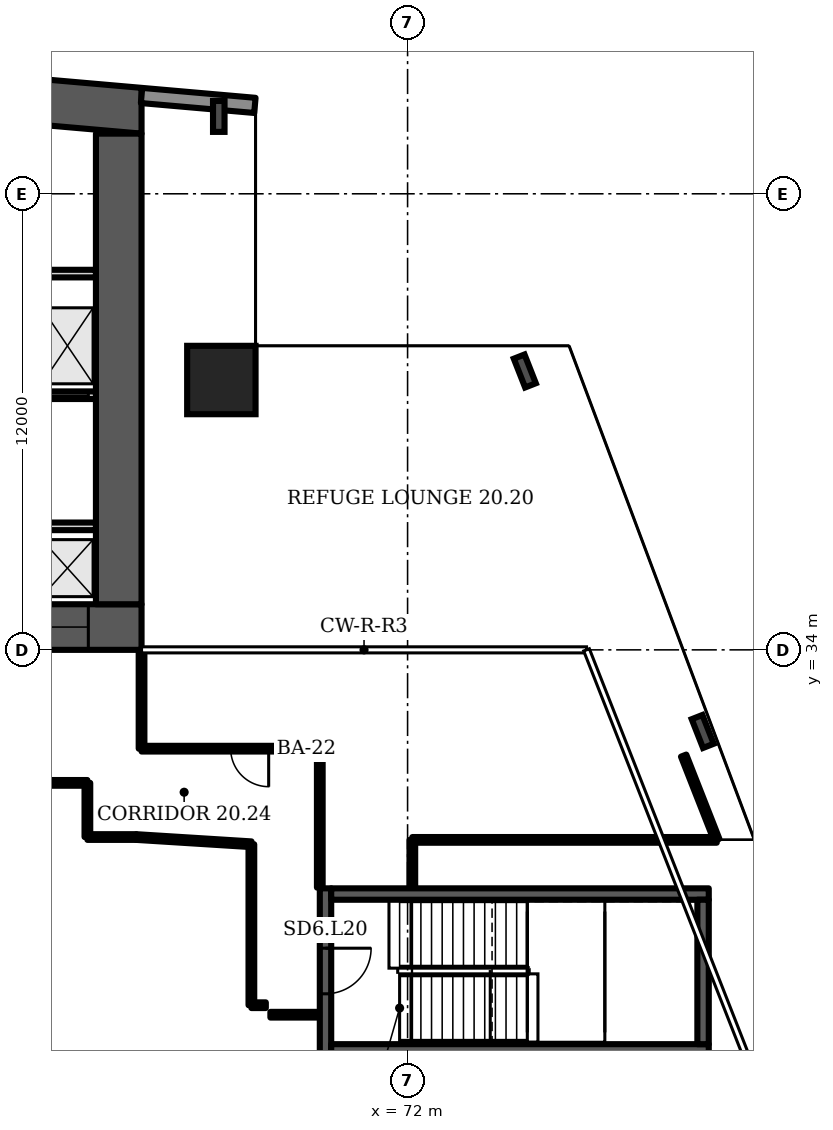
"""IFC4 building model, lengths in metres.
Left out: names, types, materials, properties, quantities, classifications, styles, units other than length and angle.
Written with IfcOpenShell. Run it as: python <this file> out.ifc"""

import sys

from ifc_helpers import new_model, si_unit, direction, frame, frame_2d, origin, origin_2d, place, context, subcontext, project, spatial, polyline, rectangle, i_section, outline, extrude, element, fill, save


model = new_model("IFC4")
c1 = context("Model", 3, precision=1e-05, world=origin(), true_north=direction((0.0, 1.0)))
c2 = subcontext(c1, "Body", "Model", "MODEL_VIEW")
j1 = project(units=[si_unit("LENGTHUNIT", "METRE"), si_unit("PLANEANGLEUNIT", "RADIAN")], contexts=[c1])
p1 = place(None, origin())
s1 = spatial("IfcSite", under=j1, at=p1, CompositionType="ELEMENT")
p2 = place(p1, origin())
s2 = spatial("IfcBuilding", under=s1, at=p2, CompositionType="ELEMENT")
p3 = place(p2, frame((0.0, 0.0, 91.9)))
s3 = spatial("IfcBuildingStorey", under=s2, at=p3, CompositionType="ELEMENT", Elevation=91.9)
p4 = place(p3, origin())
e1 = element("IfcWall", 1, at=p4, inside=s3, PredefinedType="SHEAR", context=c2, shape_type="SweptSolid", body=[
    extrude(outline(polyline([(9.0, 47.583), (37.0, 50.032), (65.0, 47.583), (65.0, 48.787), (37.0, 51.237), (9.0, 48.787), (9.0, 47.583)])), origin(), (0.0, 0.0, 1.0), 4.8),
])
p5 = place(p3, frame((9.0, 34.6, 0.0), z_axis=(0.0, 0.0, 1.0), x_axis=(1.0, 0.0, 0.0)))
e2 = element("IfcWall", 2, at=p5, inside=s3, PredefinedType="SHEAR", context=c2, shape_type="SweptSolid", body=[
    extrude(rectangle(XDim=56.0, YDim=1.2, at=frame_2d((28.0, 0.0))), origin(), (0.0, 0.0, 1.0), 4.8),
])
p6 = place(p5, frame((3.3, 0.0, 0.0)))
e3 = element("IfcOpeningElement", 3, at=p6, cuts=e2, PredefinedType="OPENING", context=c2, shape_type="SweptSolid", body=[
    extrude(rectangle(XDim=1.0, YDim=2.1, at=frame_2d((0.5, 1.05))), frame((0.0, 0.61, 0.0), z_axis=(0.0, -1.0, 0.0), x_axis=(1.0, 0.0, 0.0)), (0.0, 0.0, 1.0), 1.22),
])
p7 = place(p5, frame((7.867, 0.0, 0.0)))
e4 = element("IfcOpeningElement", 4, at=p7, cuts=e2, PredefinedType="OPENING", context=c2, shape_type="SweptSolid", body=[
    extrude(rectangle(XDim=1.1, YDim=2.1, at=frame_2d((0.55, 1.05))), frame((0.0, 0.61, 0.0), z_axis=(0.0, -1.0, 0.0), x_axis=(1.0, 0.0, 0.0)), (0.0, 0.0, 1.0), 1.22),
])
p8 = place(p5, frame((12.033, 0.0, 0.0)))
e5 = element("IfcOpeningElement", 5, at=p8, cuts=e2, PredefinedType="OPENING", context=c2, shape_type="SweptSolid", body=[
    extrude(rectangle(XDim=1.1, YDim=2.1, at=frame_2d((0.55, 1.05))), frame((0.0, 0.61, 0.0), z_axis=(0.0, -1.0, 0.0), x_axis=(1.0, 0.0, 0.0)), (0.0, 0.0, 1.0), 1.22),
])
p9 = place(p5, frame((9.8, 0.0, 0.0)))
e6 = element("IfcOpeningElement", 6, at=p9, cuts=e2, PredefinedType="OPENING", context=c2, shape_type="SweptSolid", body=[
    extrude(rectangle(XDim=1.4, YDim=2.1, at=frame_2d((0.7, 1.05))), frame((0.0, 0.61, 0.0), z_axis=(0.0, -1.0, 0.0), x_axis=(1.0, 0.0, 0.0)), (0.0, 0.0, 1.0), 1.22),
])
p10 = place(p5, frame((14.65, 0.0, 0.0)))
e7 = element("IfcOpeningElement", 7, at=p10, cuts=e2, PredefinedType="OPENING", context=c2, shape_type="SweptSolid", body=[
    extrude(rectangle(XDim=1.2, YDim=2.1, at=frame_2d((0.6, 1.05))), frame((0.0, 0.61, 0.0), z_axis=(0.0, -1.0, 0.0), x_axis=(1.0, 0.0, 0.0)), (0.0, 0.0, 1.0), 1.22),
])
p11 = place(p5, frame((21.867, 0.0, 0.0)))
e8 = element("IfcOpeningElement", 8, at=p11, cuts=e2, PredefinedType="OPENING", context=c2, shape_type="SweptSolid", body=[
    extrude(rectangle(XDim=1.1, YDim=2.1, at=frame_2d((0.55, 1.05))), frame((0.0, 0.61, 0.0), z_axis=(0.0, -1.0, 0.0), x_axis=(1.0, 0.0, 0.0)), (0.0, 0.0, 1.0), 1.22),
])
p12 = place(p5, frame((26.033, 0.0, 0.0)))
e9 = element("IfcOpeningElement", 9, at=p12, cuts=e2, PredefinedType="OPENING", context=c2, shape_type="SweptSolid", body=[
    extrude(rectangle(XDim=1.1, YDim=2.1, at=frame_2d((0.55, 1.05))), frame((0.0, 0.61, 0.0), z_axis=(0.0, -1.0, 0.0), x_axis=(1.0, 0.0, 0.0)), (0.0, 0.0, 1.0), 1.22),
])
p13 = place(p5, frame((23.8, 0.0, 0.0)))
e10 = element("IfcOpeningElement", 10, at=p13, cuts=e2, PredefinedType="OPENING", context=c2, shape_type="SweptSolid", body=[
    extrude(rectangle(XDim=1.4, YDim=2.1, at=frame_2d((0.7, 1.05))), frame((0.0, 0.61, 0.0), z_axis=(0.0, -1.0, 0.0), x_axis=(1.0, 0.0, 0.0)), (0.0, 0.0, 1.0), 1.22),
])
p14 = place(p5, frame((28.867, 0.0, 0.0)))
e11 = element("IfcOpeningElement", 11, at=p14, cuts=e2, PredefinedType="OPENING", context=c2, shape_type="SweptSolid", body=[
    extrude(rectangle(XDim=1.1, YDim=2.1, at=frame_2d((0.55, 1.05))), frame((0.0, 0.61, 0.0), z_axis=(0.0, -1.0, 0.0), x_axis=(1.0, 0.0, 0.0)), (0.0, 0.0, 1.0), 1.22),
])
p15 = place(p5, frame((33.033, 0.0, 0.0)))
e12 = element("IfcOpeningElement", 12, at=p15, cuts=e2, PredefinedType="OPENING", context=c2, shape_type="SweptSolid", body=[
    extrude(rectangle(XDim=1.1, YDim=2.1, at=frame_2d((0.55, 1.05))), frame((0.0, 0.61, 0.0), z_axis=(0.0, -1.0, 0.0), x_axis=(1.0, 0.0, 0.0)), (0.0, 0.0, 1.0), 1.22),
])
p16 = place(p5, frame((40.15, 0.0, 0.0)))
e13 = element("IfcOpeningElement", 13, at=p16, cuts=e2, PredefinedType="OPENING", context=c2, shape_type="SweptSolid", body=[
    extrude(rectangle(XDim=1.2, YDim=2.1, at=frame_2d((0.6, 1.05))), frame((0.0, 0.61, 0.0), z_axis=(0.0, -1.0, 0.0), x_axis=(1.0, 0.0, 0.0)), (0.0, 0.0, 1.0), 1.22),
])
p17 = place(p5, frame((44.8, 0.0, 0.0)))
e14 = element("IfcOpeningElement", 14, at=p17, cuts=e2, PredefinedType="OPENING", context=c2, shape_type="SweptSolid", body=[
    extrude(rectangle(XDim=1.4, YDim=2.1, at=frame_2d((0.7, 1.05))), frame((0.0, 0.61, 0.0), z_axis=(0.0, -1.0, 0.0), x_axis=(1.0, 0.0, 0.0)), (0.0, 0.0, 1.0), 1.22),
])
p18 = place(p5, frame((49.867, 0.0, 0.0)))
e15 = element("IfcOpeningElement", 15, at=p18, cuts=e2, PredefinedType="OPENING", context=c2, shape_type="SweptSolid", body=[
    extrude(rectangle(XDim=1.1, YDim=2.1, at=frame_2d((0.55, 1.05))), frame((0.0, 0.61, 0.0), z_axis=(0.0, -1.0, 0.0), x_axis=(1.0, 0.0, 0.0)), (0.0, 0.0, 1.0), 1.22),
])
p19 = place(p5, frame((53.5, 0.0, 0.0)))
e16 = element("IfcOpeningElement", 16, at=p19, cuts=e2, PredefinedType="OPENING", context=c2, shape_type="SweptSolid", body=[
    extrude(rectangle(XDim=1.1, YDim=2.1, at=frame_2d((0.55, 1.05))), frame((0.0, 0.61, 0.0), z_axis=(0.0, -1.0, 0.0), x_axis=(1.0, 0.0, 0.0)), (0.0, 0.0, 1.0), 1.22),
])
p20 = place(p5, frame((51.567, 0.0, 0.0)))
e17 = element("IfcOpeningElement", 17, at=p20, cuts=e2, PredefinedType="OPENING", context=c2, shape_type="SweptSolid", body=[
    extrude(rectangle(XDim=1.4, YDim=2.1, at=frame_2d((0.7, 1.05))), frame((0.0, 0.61, 0.0), z_axis=(0.0, -1.0, 0.0), x_axis=(1.0, 0.0, 0.0)), (0.0, 0.0, 1.0), 1.22),
])
p21 = place(p3, frame((64.4, 35.2, 0.0), z_axis=(0.0, 0.0, 1.0), x_axis=(0.0, 1.0, 0.0)))
e18 = element("IfcWall", 18, at=p21, inside=s3, PredefinedType="SHEAR", context=c2, shape_type="SweptSolid", body=[
    extrude(rectangle(XDim=12.383, YDim=1.2, at=frame_2d((6.191, 0.0))), origin(), (0.0, 0.0, 1.0), 4.8),
])
p22 = place(p3, frame((67.1, 41.1, 0.0), z_axis=(0.0, 0.0, 1.0), x_axis=(1.0, 0.0, 0.0)))
e19 = element("IfcColumn", 19, at=p22, inside=s3, PredefinedType="COLUMN", context=c2, shape_type="SweptSolid", body=[
    extrude(rectangle(XDim=1.8, YDim=1.8, at=origin_2d()), origin(), (0.0, 0.0, 1.0), 4.8),
])
for number, where, z_axis, x_axis in (
    (20, (79.766, 31.853, 0.0), (0.0, 0.0, 1.0), (0.931, 0.366, 0.0)),
    (21, (75.085, 41.338, 0.0), (0.0, 0.0, 1.0), (0.931, 0.366, 0.0)),
    (22, (67.032, 48.036, 0.0), (0.0, 0.0, 1.0), (1.0, 0.0, 0.0)),
):
    element("IfcColumn", number, at=place(p3, frame(where, z_axis=z_axis, x_axis=x_axis)), inside=s3, PredefinedType="COLUMN", context=c2, shape_type="SweptSolid", body=[
        extrude(i_section(OverallWidth=0.303, OverallDepth=0.814, WebThickness=0.021, FlangeThickness=0.04, FilletRadius=0.03, at=origin_2d()), origin(), (0.0, 0.0, 1.0), 4.8),
    ])
p23 = place(p3, frame((67.983, 48.326, 0.0), z_axis=(0.0, 0.0, 1.0), x_axis=(-0.996194, 0.087168, 0.0)))
e23 = element("IfcWall", 23, at=p23, inside=s3, PredefinedType="SOLIDWALL", context=c2, shape_type="SweptSolid", body=[
    extrude(rectangle(XDim=2.994, YDim=0.4, at=frame_2d((1.497, 0.0))), origin(), (0.0, 0.0, 1.0), 4.4),
])
p24 = place(p3, frame((58.6, 40.7, 0.0), z_axis=(0.0, 0.0, 1.0), x_axis=(1.0, 0.0, 0.0)))
e24 = element("IfcWall", 24, at=p24, inside=s3, PredefinedType="PARTITIONING", context=c2, shape_type="SweptSolid", body=[
    extrude(rectangle(XDim=5.2, YDim=0.2, at=frame_2d((2.6, 0.0))), origin(), (0.0, 0.0, 1.0), 4.4),
])
p25 = place(p24, frame((0.267, 0.0, 0.0)))
e25 = element("IfcOpeningElement", 25, at=p25, cuts=e24, PredefinedType="OPENING", context=c2, shape_type="SweptSolid", body=[
    extrude(rectangle(XDim=1.1, YDim=2.1, at=frame_2d((0.55, 1.05))), frame((0.0, 0.11, 0.0), z_axis=(0.0, -1.0, 0.0), x_axis=(1.0, 0.0, 0.0)), (0.0, 0.0, 1.0), 0.22),
])
p26 = place(p24, frame((2.117, 0.0, 0.0)))
e26 = element("IfcOpeningElement", 26, at=p26, cuts=e24, PredefinedType="OPENING", context=c2, shape_type="SweptSolid", body=[
    extrude(rectangle(XDim=1.1, YDim=2.1, at=frame_2d((0.55, 1.05))), frame((0.0, 0.11, 0.0), z_axis=(0.0, -1.0, 0.0), x_axis=(1.0, 0.0, 0.0)), (0.0, 0.0, 1.0), 0.22),
])
p27 = place(p24, frame((3.9, 0.0, 0.0)))
e27 = element("IfcOpeningElement", 27, at=p27, cuts=e24, PredefinedType="OPENING", context=c2, shape_type="SweptSolid", body=[
    extrude(rectangle(XDim=1.1, YDim=2.1, at=frame_2d((0.55, 1.05))), frame((0.0, 0.11, 0.0), z_axis=(0.0, -1.0, 0.0), x_axis=(1.0, 0.0, 0.0)), (0.0, 0.0, 1.0), 0.22),
])
p28 = place(p3, origin())
e28 = element("IfcWall", 28, at=p28, inside=s3, PredefinedType="PARTITIONING", context=c2, shape_type="SweptSolid", body=[
    extrude(outline(polyline([(62.1, 37.35), (62.3, 37.35), (63.8, 37.35), (63.8, 37.15), (62.3, 37.15), (62.3, 35.2), (62.1, 35.2), (62.1, 37.35)])), origin(), (0.0, 0.0, 1.0), 4.4),
])
p29 = place(p3, origin())
e29 = element("IfcWall", 29, at=p29, inside=s3, PredefinedType="PARTITIONING", context=c2, shape_type="SweptSolid", body=[
    extrude(outline(polyline([(60.433, 40.8), (60.233, 40.8), (60.233, 43.8), (58.6, 43.8), (58.6, 44.0), (63.8, 44.0), (63.8, 43.8), (62.3, 43.8), (62.3, 40.8), (62.1, 40.8), (62.1, 43.8), (60.433, 43.8), (60.433, 40.8)])), origin(), (0.0, 0.0, 1.0), 4.4),
])
p30 = place(p3, frame((69.84, 23.325, 0.0), z_axis=(0.0, 0.0, 1.0), x_axis=(0.0, 1.0, 0.0)))
e30 = element("IfcWall", 30, at=p30, inside=s3, PredefinedType="SHEAR", context=c2, shape_type="SweptSolid", body=[
    extrude(rectangle(XDim=4.4, YDim=0.3, at=frame_2d((2.2, 0.0))), origin(), (0.0, 0.0, 1.0), 4.4),
])
p31 = place(p30, frame((1.625, 0.0, 0.0)))
e31 = element("IfcOpeningElement", 31, at=p31, cuts=e30, PredefinedType="OPENING", context=c2, shape_type="SweptSolid", body=[
    extrude(rectangle(XDim=1.2, YDim=2.1, at=frame_2d((0.6, 1.05))), frame((0.0, 0.16, 0.0), z_axis=(0.0, -1.0, 0.0), x_axis=(1.0, 0.0, 0.0)), (0.0, 0.0, 1.0), 0.32),
])
p32 = place(p3, frame((63.575, 29.075, 0.0), z_axis=(0.0, 0.0, 1.0), x_axis=(0.0, 1.0, 0.0)))
e32 = element("IfcWall", 32, at=p32, inside=s3, PredefinedType="PARTITIONING", context=c2, shape_type="SweptSolid", body=[
    extrude(rectangle(XDim=1.425, YDim=0.15, at=frame_2d((0.712, 0.0))), origin(), (0.0, 0.0, 1.0), 4.4),
])
p33 = place(p3, frame((63.575, 29.075, 0.0), z_axis=(0.0, 0.0, 1.0), x_axis=(1.0, 0.0, 0.0)))
e33 = element("IfcWall", 33, at=p33, inside=s3, PredefinedType="PARTITIONING", context=c2, shape_type="SweptSolid", body=[
    extrude(rectangle(XDim=1.285, YDim=0.15, at=frame_2d((0.643, 0.0))), origin(), (0.0, 0.0, 1.0), 4.4),
])
p34 = place(p3, frame((65.0, 31.4, 0.0), z_axis=(0.0, 0.0, 1.0), x_axis=(0.0, 1.0, 0.0)))
e34 = element("IfcWall", 34, at=p34, inside=s3, PredefinedType="PARTITIONING", context=c2, shape_type="SweptSolid", body=[
    extrude(rectangle(XDim=2.58, YDim=0.15, at=frame_2d((1.29, 0.0))), origin(), (0.0, 0.0, 1.0), 4.4),
])
p35 = place(p3, frame((65.0, 31.4, 0.0), z_axis=(0.0, 0.0, 1.0), x_axis=(1.0, 0.0, 0.0)))
e35 = element("IfcWall", 35, at=p35, inside=s3, PredefinedType="PARTITIONING", context=c2, shape_type="SweptSolid", body=[
    extrude(rectangle(XDim=4.69, YDim=0.15, at=frame_2d((2.345, 0.0))), origin(), (0.0, 0.0, 1.0), 4.4),
])
p36 = place(p35, frame((2.345, 0.0, 0.0)))
e36 = element("IfcOpeningElement", 36, at=p36, cuts=e35, PredefinedType="OPENING", context=c2, shape_type="SweptSolid", body=[
    extrude(rectangle(XDim=1.0, YDim=2.1, at=frame_2d((0.5, 1.05))), frame((0.0, 0.085, 0.0), z_axis=(0.0, -1.0, 0.0), x_axis=(1.0, 0.0, 0.0)), (0.0, 0.0, 1.0), 0.17),
])
p37 = place(p3, frame((67.89, 28.885, 0.0), z_axis=(0.0, 0.0, 1.0), x_axis=(-0.998045, 0.062569, 0.0)))
e37 = element("IfcWall", 37, at=p37, inside=s3, PredefinedType="PARTITIONING", context=c2, shape_type="SweptSolid", body=[
    extrude(rectangle(XDim=3.036, YDim=0.15, at=frame_2d((1.518, 0.0))), origin(), (0.0, 0.0, 1.0), 4.4),
])
p38 = place(p3, frame((67.89, 24.65, 0.0), z_axis=(0.0, 0.0, 1.0), x_axis=(0.0, 1.0, 0.0)))
e38 = element("IfcWall", 38, at=p38, inside=s3, PredefinedType="PARTITIONING", context=c2, shape_type="SweptSolid", body=[
    extrude(rectangle(XDim=4.235, YDim=0.15, at=frame_2d((2.118, 0.0))), origin(), (0.0, 0.0, 1.0), 4.4),
])
p39 = place(p3, frame((67.89, 24.65, 0.0), z_axis=(0.0, 0.0, 1.0), x_axis=(1.0, 0.0, 0.0)))
e39 = element("IfcWall", 39, at=p39, inside=s3, PredefinedType="PARTITIONING", context=c2, shape_type="SweptSolid", body=[
    extrude(rectangle(XDim=0.38, YDim=0.15, at=frame_2d((0.19, 0.0))), origin(), (0.0, 0.0, 1.0), 4.4),
])
p40 = place(p3, frame((68.39, 24.4, 0.0), z_axis=(0.0, 0.0, 1.0), x_axis=(1.0, 0.0, 0.0)))
e40 = element("IfcWall", 40, at=p40, inside=s3, PredefinedType="PARTITIONING", context=c2, shape_type="SweptSolid", body=[
    extrude(rectangle(XDim=1.281, YDim=0.15, at=frame_2d((0.64, 0.0))), origin(), (0.0, 0.0, 1.0), 4.4),
])
p41 = place(p3, frame((69.69, 27.745, 0.0), z_axis=(0.0, 0.0, 1.0), x_axis=(0.0, 1.0, 0.0)))
e41 = element("IfcWall", 41, at=p41, inside=s3, PredefinedType="PARTITIONING", context=c2, shape_type="SweptSolid", body=[
    extrude(rectangle(XDim=3.655, YDim=0.15, at=frame_2d((1.827, 0.0))), origin(), (0.0, 0.0, 1.0), 4.4),
])
p42 = place(p3, frame((72.125, 27.745, 0.0), z_axis=(0.0, 0.0, 1.0), x_axis=(0.0, 1.0, 0.0)))
e42 = element("IfcWall", 42, at=p42, inside=s3, PredefinedType="PARTITIONING", context=c2, shape_type="SweptSolid", body=[
    extrude(rectangle(XDim=1.255, YDim=0.15, at=frame_2d((0.627, 0.0))), origin(), (0.0, 0.0, 1.0), 4.4),
])
p43 = place(p3, frame((72.125, 29.0, 0.0), z_axis=(0.0, 0.0, 1.0), x_axis=(1.0, 0.0, 0.0)))
e43 = element("IfcWall", 43, at=p43, inside=s3, PredefinedType="PARTITIONING", context=c2, shape_type="SweptSolid", body=[
    extrude(rectangle(XDim=8.01, YDim=0.15, at=frame_2d((4.005, 0.0))), origin(), (0.0, 0.0, 1.0), 4.4),
])
p44 = place(p3, frame((80.135, 29.0, 0.0), z_axis=(0.0, 0.0, 1.0), x_axis=(-0.365801, 0.930692, 0.0)))
e44 = element("IfcWall", 44, at=p44, inside=s3, PredefinedType="PARTITIONING", context=c2, shape_type="SweptSolid", body=[
    extrude(rectangle(XDim=2.383, YDim=0.15, at=frame_2d((1.191, 0.0))), origin(), (0.0, 0.0, 1.0), 4.4),
])
p45 = place(p3, frame((44.15, 30.5, 0.0), z_axis=(0.0, 0.0, 1.0), x_axis=(1.0, 0.0, 0.0)))
e45 = element("IfcWall", 45, at=p45, inside=s3, PredefinedType="PARTITIONING", context=c2, shape_type="SweptSolid", body=[
    extrude(rectangle(XDim=19.425, YDim=0.15, at=frame_2d((9.712, 0.0))), origin(), (0.0, 0.0, 1.0), 4.4),
])
p46 = place(p45, frame((7.805, 0.0, 0.0)))
e46 = element("IfcOpeningElement", 46, at=p46, cuts=e45, PredefinedType="OPENING", context=c2, shape_type="SweptSolid", body=[
    extrude(rectangle(XDim=1.0, YDim=2.1, at=frame_2d((0.5, 1.05))), frame((0.0, 0.085, 0.0), z_axis=(0.0, -1.0, 0.0), x_axis=(1.0, 0.0, 0.0)), (0.0, 0.0, 1.0), 0.17),
])
p47 = place(p45, frame((17.34, 0.0, 0.0)))
e47 = element("IfcOpeningElement", 47, at=p47, cuts=e45, PredefinedType="OPENING", context=c2, shape_type="SweptSolid", body=[
    extrude(rectangle(XDim=1.0, YDim=2.1, at=frame_2d((0.5, 1.05))), frame((0.0, 0.085, 0.0), z_axis=(0.0, -1.0, 0.0), x_axis=(1.0, 0.0, 0.0)), (0.0, 0.0, 1.0), 0.17),
])
for number, where, z_axis, x_axis in (
    (48, (69.99, 23.475, 0.0), (0.0, 0.0, 1.0), (1.0, 0.0, 0.0)),
    (49, (69.99, 27.575, 0.0), (0.0, 0.0, 1.0), (1.0, 0.0, 0.0)),
):
    element("IfcWall", number, at=place(p3, frame(where, z_axis=z_axis, x_axis=x_axis)), inside=s3, PredefinedType="SHEAR", context=c2, shape_type="SweptSolid", body=[
        extrude(rectangle(XDim=9.935, YDim=0.3, at=frame_2d((4.967, 0.0))), origin(), (0.0, 0.0, 1.0), 4.4),
    ])
p48 = place(p3, frame((79.775, 23.625, 0.0), z_axis=(0.0, 0.0, 1.0), x_axis=(0.0, 1.0, 0.0)))
e50 = element("IfcWall", 50, at=p48, inside=s3, PredefinedType="SHEAR", context=c2, shape_type="SweptSolid", body=[
    extrude(rectangle(XDim=3.8, YDim=0.3, at=frame_2d((1.9, 0.0))), origin(), (0.0, 0.0, 1.0), 4.4),
])
p49 = place(p19, origin())
e51 = element("IfcDoor", 51, at=p49, inside=s3, OperationType="DOUBLE_DOOR_SLIDING", PredefinedType="DOOR", context=c2, shape_type="SweptSolid", body=[
    extrude(rectangle(XDim=1.1, YDim=2.1, at=frame_2d((0.55, 1.05))), frame((0.0, 0.025, 0.0), z_axis=(0.0, -1.0, 0.0), x_axis=(1.0, 0.0, 0.0)), (0.0, 0.0, 1.0), 0.05),
])
fill(e16, e51)
p50 = place(p27, origin())
e52 = element("IfcDoor", 52, at=p50, inside=s3, OperationType="DOUBLE_DOOR_SLIDING", PredefinedType="DOOR", context=c2, shape_type="SweptSolid", body=[
    extrude(rectangle(XDim=1.1, YDim=2.1, at=frame_2d((0.55, 1.05))), frame((0.0, 0.025, 0.0), z_axis=(0.0, -1.0, 0.0), x_axis=(1.0, 0.0, 0.0)), (0.0, 0.0, 1.0), 0.05),
])
fill(e27, e52)
p51 = place(p31, origin())
e53 = element("IfcDoor", 53, at=p51, inside=s3, OperationType="SINGLE_SWING_RIGHT", PredefinedType="DOOR", context=c2, shape_type="SweptSolid", body=[
    extrude(rectangle(XDim=1.2, YDim=2.1, at=frame_2d((0.6, 1.05))), frame((0.0, 0.025, 0.0), z_axis=(0.0, -1.0, 0.0), x_axis=(1.0, 0.0, 0.0)), (0.0, 0.0, 1.0), 0.05),
])
fill(e31, e53)
p52 = place(p36, origin())
e54 = element("IfcDoor", 54, at=p52, inside=s3, OperationType="SINGLE_SWING_RIGHT", PredefinedType="DOOR", context=c2, shape_type="SweptSolid", body=[
    extrude(rectangle(XDim=1.0, YDim=2.1, at=frame_2d((0.5, 1.05))), frame((0.0, 0.025, 0.0), z_axis=(0.0, -1.0, 0.0), x_axis=(1.0, 0.0, 0.0)), (0.0, 0.0, 1.0), 0.05),
])
fill(e36, e54)
save(model, sys.argv[1])
